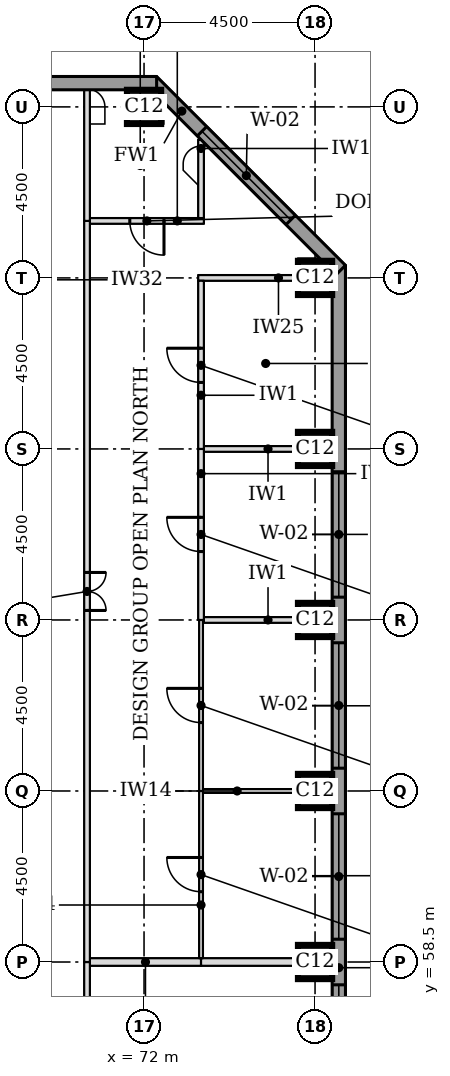
"""IFC4 building model, lengths in metres.
Left out: names, types, materials, properties, quantities, classifications, styles, units other than length and angle.
Written with IfcOpenShell. Run it as: python <this file> out.ifc"""

import sys

from ifc_helpers import new_model, si_unit, direction, frame, frame_2d, origin, origin_2d, place, context, subcontext, project, spatial, rectangle, extrude, element, fill, save


model = new_model("IFC4")
c1 = context("Model", 3, precision=1e-05, world=origin(), true_north=direction((0.0, 1.0)))
c2 = subcontext(c1, "Body", "Model", "MODEL_VIEW")
j1 = project(units=[si_unit("LENGTHUNIT", "METRE"), si_unit("PLANEANGLEUNIT", "RADIAN")], contexts=[c1])
p1 = place(None, origin())
s1 = spatial("IfcSite", under=j1, at=p1, CompositionType="ELEMENT")
p2 = place(p1, origin())
s2 = spatial("IfcBuilding", under=s1, at=p2, CompositionType="ELEMENT")
p3 = place(p2, frame((0.0, 0.0, 226.7)))
s3 = spatial("IfcBuildingStorey", under=s2, at=p3, CompositionType="ELEMENT", Elevation=226.7)
for number, where, z_axis, x_axis in (
    (1, (76.5, 58.5, 0.0), (0.0, 0.0, 1.0), (1.0, 0.0, 0.0)),
    (2, (76.5, 63.0, 0.0), (0.0, 0.0, 1.0), (1.0, 0.0, 0.0)),
    (3, (76.5, 67.5, 0.0), (0.0, 0.0, 1.0), (1.0, 0.0, 0.0)),
    (4, (76.5, 72.0, 0.0), (0.0, 0.0, 1.0), (1.0, 0.0, 0.0)),
    (5, (76.5, 76.5, 0.0), (0.0, 0.0, 1.0), (1.0, 0.0, 0.0)),
    (6, (72.0, 81.0, 0.0), (0.0, 0.0, 1.0), (1.0, 0.0, 0.0)),
):
    element("IfcColumn", number, at=place(p3, frame(where, z_axis=z_axis, x_axis=x_axis)), inside=s3, PredefinedType="COLUMN", context=c2, shape_type="SweptSolid", body=[
        extrude(rectangle(XDim=0.9, YDim=0.9, at=origin_2d()), origin(), (0.0, 0.0, 1.0), 3.7),
    ])
p4 = place(p3, frame((77.125, 44.669, 0.0), z_axis=(0.0, 0.0, 1.0), x_axis=(0.0, 1.0, 0.0)))
e7 = element("IfcWall", 7, at=p4, inside=s3, PredefinedType="STANDARD", context=c2, shape_type="SweptSolid", body=[
    extrude(rectangle(XDim=32.163, YDim=0.35, at=frame_2d((16.081, 0.0))), origin(), (0.0, 0.0, 1.0), 3.525),
])
p5 = place(p4, frame((5.431, 0.0, 0.9)))
e8 = element("IfcOpeningElement", 8, at=p5, cuts=e7, PredefinedType="OPENING", context=c2, shape_type="SweptSolid", body=[
    extrude(rectangle(XDim=3.3, YDim=1.9, at=frame_2d((1.65, 0.95))), frame((0.0, 0.185, 0.0), z_axis=(0.0, -1.0, 0.0), x_axis=(1.0, 0.0, 0.0)), (0.0, 0.0, 1.0), 0.37),
])
p6 = place(p4, frame((9.931, 0.0, 0.9)))
e9 = element("IfcOpeningElement", 9, at=p6, cuts=e7, PredefinedType="OPENING", context=c2, shape_type="SweptSolid", body=[
    extrude(rectangle(XDim=3.3, YDim=1.9, at=frame_2d((1.65, 0.95))), frame((0.0, 0.185, 0.0), z_axis=(0.0, -1.0, 0.0), x_axis=(1.0, 0.0, 0.0)), (0.0, 0.0, 1.0), 0.37),
])
p7 = place(p4, frame((14.431, 0.0, 0.9)))
e10 = element("IfcOpeningElement", 10, at=p7, cuts=e7, PredefinedType="OPENING", context=c2, shape_type="SweptSolid", body=[
    extrude(rectangle(XDim=3.3, YDim=1.9, at=frame_2d((1.65, 0.95))), frame((0.0, 0.185, 0.0), z_axis=(0.0, -1.0, 0.0), x_axis=(1.0, 0.0, 0.0)), (0.0, 0.0, 1.0), 0.37),
])
p8 = place(p4, frame((18.931, 0.0, 0.9)))
e11 = element("IfcOpeningElement", 11, at=p8, cuts=e7, PredefinedType="OPENING", context=c2, shape_type="SweptSolid", body=[
    extrude(rectangle(XDim=3.3, YDim=1.9, at=frame_2d((1.65, 0.95))), frame((0.0, 0.185, 0.0), z_axis=(0.0, -1.0, 0.0), x_axis=(1.0, 0.0, 0.0)), (0.0, 0.0, 1.0), 0.37),
])
p9 = place(p4, frame((23.431, 0.0, 0.9)))
e12 = element("IfcOpeningElement", 12, at=p9, cuts=e7, PredefinedType="OPENING", context=c2, shape_type="SweptSolid", body=[
    extrude(rectangle(XDim=3.3, YDim=1.9, at=frame_2d((1.65, 0.95))), frame((0.0, 0.185, 0.0), z_axis=(0.0, -1.0, 0.0), x_axis=(1.0, 0.0, 0.0)), (0.0, 0.0, 1.0), 0.37),
])
p10 = place(p3, frame((77.176, 76.708, 0.0), z_axis=(0.0, 0.0, 1.0), x_axis=(-0.707106781187, 0.707106781187, 0.0)))
e13 = element("IfcWall", 13, at=p10, inside=s3, PredefinedType="STANDARD", context=c2, shape_type="SweptSolid", body=[
    extrude(rectangle(XDim=7.027, YDim=0.35, at=frame_2d((3.513, 0.0))), origin(), (0.0, 0.0, 1.0), 3.525),
])
p11 = place(p10, frame((1.863, 0.0, 0.9)))
e14 = element("IfcOpeningElement", 14, at=p11, cuts=e13, PredefinedType="OPENING", context=c2, shape_type="SweptSolid", body=[
    extrude(rectangle(XDim=3.3, YDim=1.9, at=frame_2d((1.65, 0.95))), frame((0.0, 0.185, 0.0), z_axis=(0.0, -1.0, 0.0), x_axis=(1.0, 0.0, 0.0)), (0.0, 0.0, 1.0), 0.37),
])
p12 = place(p3, frame((72.331, 81.625, 0.0), z_axis=(0.0, 0.0, 1.0), x_axis=(-1.0, 0.0, 0.0)))
e15 = element("IfcWall", 15, at=p12, inside=s3, PredefinedType="STANDARD", context=c2, shape_type="SweptSolid", body=[
    extrude(rectangle(XDim=32.163, YDim=0.35, at=frame_2d((16.081, 0.0))), origin(), (0.0, 0.0, 1.0), 3.525),
])
p13 = place(p12, frame((5.431, 0.0, 0.9)))
e16 = element("IfcOpeningElement", 16, at=p13, cuts=e15, PredefinedType="OPENING", context=c2, shape_type="SweptSolid", body=[
    extrude(rectangle(XDim=3.3, YDim=1.9, at=frame_2d((1.65, 0.95))), frame((0.0, 0.185, 0.0), z_axis=(0.0, -1.0, 0.0), x_axis=(1.0, 0.0, 0.0)), (0.0, 0.0, 1.0), 0.37),
])
p14 = place(p12, frame((9.931, 0.0, 0.9)))
e17 = element("IfcOpeningElement", 17, at=p14, cuts=e15, PredefinedType="OPENING", context=c2, shape_type="SweptSolid", body=[
    extrude(rectangle(XDim=3.3, YDim=1.9, at=frame_2d((1.65, 0.95))), frame((0.0, 0.185, 0.0), z_axis=(0.0, -1.0, 0.0), x_axis=(1.0, 0.0, 0.0)), (0.0, 0.0, 1.0), 0.37),
])
p15 = place(p12, frame((14.431, 0.0, 0.9)))
e18 = element("IfcOpeningElement", 18, at=p15, cuts=e15, PredefinedType="OPENING", context=c2, shape_type="SweptSolid", body=[
    extrude(rectangle(XDim=3.3, YDim=1.9, at=frame_2d((1.65, 0.95))), frame((0.0, 0.185, 0.0), z_axis=(0.0, -1.0, 0.0), x_axis=(1.0, 0.0, 0.0)), (0.0, 0.0, 1.0), 0.37),
])
p16 = place(p12, frame((18.931, 0.0, 0.9)))
e19 = element("IfcOpeningElement", 19, at=p16, cuts=e15, PredefinedType="OPENING", context=c2, shape_type="SweptSolid", body=[
    extrude(rectangle(XDim=3.3, YDim=1.9, at=frame_2d((1.65, 0.95))), frame((0.0, 0.185, 0.0), z_axis=(0.0, -1.0, 0.0), x_axis=(1.0, 0.0, 0.0)), (0.0, 0.0, 1.0), 0.37),
])
p17 = place(p12, frame((23.431, 0.0, 0.9)))
e20 = element("IfcOpeningElement", 20, at=p17, cuts=e15, PredefinedType="OPENING", context=c2, shape_type="SweptSolid", body=[
    extrude(rectangle(XDim=3.3, YDim=1.9, at=frame_2d((1.65, 0.95))), frame((0.0, 0.185, 0.0), z_axis=(0.0, -1.0, 0.0), x_axis=(1.0, 0.0, 0.0)), (0.0, 0.0, 1.0), 0.37),
])
p18 = place(p3, frame((70.575, 58.5, 0.0), z_axis=(0.0, 0.0, 1.0), x_axis=(1.0, 0.0, 0.0)))
e21 = element("IfcWall", 21, at=p18, inside=s3, PredefinedType="PARTITIONING", context=c2, shape_type="SweptSolid", body=[
    extrude(rectangle(XDim=2.925, YDim=0.2, at=frame_2d((1.462, 0.0))), origin(), (0.0, 0.0, 1.0), 3.55),
])
p19 = place(p3, frame((73.5, 58.5, 0.0), z_axis=(0.0, 0.0, 1.0), x_axis=(1.0, 0.0, 0.0)))
e22 = element("IfcWall", 22, at=p19, inside=s3, PredefinedType="PARTITIONING", context=c2, shape_type="SweptSolid", body=[
    extrude(rectangle(XDim=3.45, YDim=0.2, at=frame_2d((1.725, 0.0))), origin(), (0.0, 0.0, 1.0), 3.55),
])
p20 = place(p3, frame((73.55, 63.0, 0.0), z_axis=(0.0, 0.0, 1.0), x_axis=(1.0, 0.0, 0.0)))
e23 = element("IfcWall", 23, at=p20, inside=s3, PredefinedType="PARTITIONING", context=c2, shape_type="SweptSolid", body=[
    extrude(rectangle(XDim=3.4, YDim=0.1, at=frame_2d((1.7, 0.0))), origin(), (0.0, 0.0, 1.0), 3.55),
])
for number, where, z_axis, x_axis in (
    (24, (73.575, 67.5, 0.0), (0.0, 0.0, 1.0), (1.0, 0.0, 0.0)),
    (25, (73.575, 72.0, 0.0), (0.0, 0.0, 1.0), (1.0, 0.0, 0.0)),
):
    element("IfcWall", number, at=place(p3, frame(where, z_axis=z_axis, x_axis=x_axis)), inside=s3, PredefinedType="PARTITIONING", context=c2, shape_type="SweptSolid", body=[
        extrude(rectangle(XDim=3.375, YDim=0.15, at=frame_2d((1.688, 0.0))), origin(), (0.0, 0.0, 1.0), 3.55),
    ])
p21 = place(p3, frame((73.425, 76.5, 0.0), z_axis=(0.0, 0.0, 1.0), x_axis=(1.0, 0.0, 0.0)))
e26 = element("IfcWall", 26, at=p21, inside=s3, PredefinedType="PARTITIONING", context=c2, shape_type="SweptSolid", body=[
    extrude(rectangle(XDim=2.625, YDim=0.15, at=frame_2d((1.312, 0.0))), origin(), (0.0, 0.0, 1.0), 3.096),
])
p22 = place(p3, frame((70.575, 78.0, 0.0), z_axis=(0.0, 0.0, 1.0), x_axis=(1.0, 0.0, 0.0)))
e27 = element("IfcWall", 27, at=p22, inside=s3, PredefinedType="PARTITIONING", context=c2, shape_type="SweptSolid", body=[
    extrude(rectangle(XDim=3.0, YDim=0.15, at=frame_2d((1.5, 0.0))), origin(), (0.0, 0.0, 1.0), 3.55),
])
p23 = place(p22, frame((1.05, 0.0, 0.0)))
e28 = element("IfcOpeningElement", 28, at=p23, cuts=e27, PredefinedType="OPENING", context=c2, shape_type="SweptSolid", body=[
    extrude(rectangle(XDim=0.9, YDim=2.1, at=frame_2d((0.45, 1.05))), frame((0.0, 0.085, 0.0), z_axis=(0.0, -1.0, 0.0), x_axis=(1.0, 0.0, 0.0)), (0.0, 0.0, 1.0), 0.17),
])
p24 = place(p3, frame((70.5, 45.0, 0.0), z_axis=(0.0, 0.0, 1.0), x_axis=(0.0, 1.0, 0.0)))
e29 = element("IfcWall", 29, at=p24, inside=s3, PredefinedType="PARTITIONING", context=c2, shape_type="SweptSolid", body=[
    extrude(rectangle(XDim=13.5, YDim=0.15, at=frame_2d((6.75, 0.0))), origin(), (0.0, 0.0, 1.0), 3.55),
])
p25 = place(p24, frame((6.25, 0.0, 0.0)))
e30 = element("IfcOpeningElement", 30, at=p25, cuts=e29, PredefinedType="OPENING", context=c2, shape_type="SweptSolid", body=[
    extrude(rectangle(XDim=1.0, YDim=2.1, at=frame_2d((0.5, 1.05))), frame((0.0, 0.085, 0.0), z_axis=(0.0, -1.0, 0.0), x_axis=(1.0, 0.0, 0.0)), (0.0, 0.0, 1.0), 0.17),
])
p26 = place(p3, frame((70.5, 58.5, 0.0), z_axis=(0.0, 0.0, 1.0), x_axis=(0.0, 1.0, 0.0)))
e31 = element("IfcWall", 31, at=p26, inside=s3, PredefinedType="PARTITIONING", context=c2, shape_type="SweptSolid", body=[
    extrude(rectangle(XDim=19.5, YDim=0.15, at=frame_2d((9.75, 0.0))), origin(), (0.0, 0.0, 1.0), 3.55),
])
p27 = place(p26, frame((9.25, 0.0, 0.0)))
e32 = element("IfcOpeningElement", 32, at=p27, cuts=e31, PredefinedType="OPENING", context=c2, shape_type="SweptSolid", body=[
    extrude(rectangle(XDim=1.0, YDim=2.1, at=frame_2d((0.5, 1.05))), frame((0.0, 0.085, 0.0), z_axis=(0.0, -1.0, 0.0), x_axis=(1.0, 0.0, 0.0)), (0.0, 0.0, 1.0), 0.17),
])
p28 = place(p3, frame((73.5, 58.6, 0.0), z_axis=(0.0, 0.0, 1.0), x_axis=(0.0, 1.0, 0.0)))
e33 = element("IfcWall", 33, at=p28, inside=s3, PredefinedType="PARTITIONING", context=c2, shape_type="SweptSolid", body=[
    extrude(rectangle(XDim=4.4, YDim=0.1, at=frame_2d((2.2, 0.0))), origin(), (0.0, 0.0, 1.0), 3.55),
])
p29 = place(p28, frame((1.75, 0.0, 0.0)))
e34 = element("IfcOpeningElement", 34, at=p29, cuts=e33, PredefinedType="OPENING", context=c2, shape_type="SweptSolid", body=[
    extrude(rectangle(XDim=0.9, YDim=2.1, at=frame_2d((0.45, 1.05))), frame((0.0, 0.06, 0.0), z_axis=(0.0, -1.0, 0.0), x_axis=(1.0, 0.0, 0.0)), (0.0, 0.0, 1.0), 0.12),
])
p30 = place(p3, frame((73.5, 63.0, 0.0), z_axis=(0.0, 0.0, 1.0), x_axis=(0.0, 1.0, 0.0)))
e35 = element("IfcWall", 35, at=p30, inside=s3, PredefinedType="PARTITIONING", context=c2, shape_type="SweptSolid", body=[
    extrude(rectangle(XDim=4.5, YDim=0.1, at=frame_2d((2.25, 0.0))), origin(), (0.0, 0.0, 1.0), 3.55),
])
p31 = place(p30, frame((1.8, 0.0, 0.0)))
e36 = element("IfcOpeningElement", 36, at=p31, cuts=e35, PredefinedType="OPENING", context=c2, shape_type="SweptSolid", body=[
    extrude(rectangle(XDim=0.9, YDim=2.1, at=frame_2d((0.45, 1.05))), frame((0.0, 0.06, 0.0), z_axis=(0.0, -1.0, 0.0), x_axis=(1.0, 0.0, 0.0)), (0.0, 0.0, 1.0), 0.12),
])
p32 = place(p3, frame((73.5, 67.5, 0.0), z_axis=(0.0, 0.0, 1.0), x_axis=(0.0, 1.0, 0.0)))
e37 = element("IfcWall", 37, at=p32, inside=s3, PredefinedType="PARTITIONING", context=c2, shape_type="SweptSolid", body=[
    extrude(rectangle(XDim=4.5, YDim=0.15, at=frame_2d((2.25, 0.0))), origin(), (0.0, 0.0, 1.0), 3.55),
])
p33 = place(p32, frame((1.8, 0.0, 0.0)))
e38 = element("IfcOpeningElement", 38, at=p33, cuts=e37, PredefinedType="OPENING", context=c2, shape_type="SweptSolid", body=[
    extrude(rectangle(XDim=0.9, YDim=2.1, at=frame_2d((0.45, 1.05))), frame((0.0, 0.085, 0.0), z_axis=(0.0, -1.0, 0.0), x_axis=(1.0, 0.0, 0.0)), (0.0, 0.0, 1.0), 0.17),
])
p34 = place(p3, frame((73.5, 72.0, 0.0), z_axis=(0.0, 0.0, 1.0), x_axis=(0.0, 1.0, 0.0)))
e39 = element("IfcWall", 39, at=p34, inside=s3, PredefinedType="PARTITIONING", context=c2, shape_type="SweptSolid", body=[
    extrude(rectangle(XDim=4.425, YDim=0.15, at=frame_2d((2.212, 0.0))), origin(), (0.0, 0.0, 1.0), 3.55),
])
p35 = place(p34, frame((1.75, 0.0, 0.0)))
e40 = element("IfcOpeningElement", 40, at=p35, cuts=e39, PredefinedType="OPENING", context=c2, shape_type="SweptSolid", body=[
    extrude(rectangle(XDim=0.9, YDim=2.1, at=frame_2d((0.45, 1.05))), frame((0.0, 0.085, 0.0), z_axis=(0.0, -1.0, 0.0), x_axis=(1.0, 0.0, 0.0)), (0.0, 0.0, 1.0), 0.17),
])
p36 = place(p3, frame((70.5, 78.0, 0.0), z_axis=(0.0, 0.0, 1.0), x_axis=(0.0, 1.0, 0.0)))
e41 = element("IfcWall", 41, at=p36, inside=s3, PredefinedType="PARTITIONING", context=c2, shape_type="SweptSolid", body=[
    extrude(rectangle(XDim=3.45, YDim=0.15, at=frame_2d((1.725, 0.0))), origin(), (0.0, 0.0, 1.0), 3.55),
])
p37 = place(p3, frame((73.5, 78.075, 0.0), z_axis=(0.0, 0.0, 1.0), x_axis=(0.0, 1.0, 0.0)))
e42 = element("IfcWall", 42, at=p37, inside=s3, PredefinedType="PARTITIONING", context=c2, shape_type="SweptSolid", body=[
    extrude(rectangle(XDim=2.062, YDim=0.15, at=frame_2d((1.031, 0.0))), origin(), (0.0, 0.0, 1.0), 3.55),
])
p38 = place(p6, origin())
e43 = element("IfcWindow", 43, at=p38, inside=s3, PartitioningType="SINGLE_PANEL", PredefinedType="WINDOW", context=c2, shape_type="SweptSolid", body=[
    extrude(rectangle(XDim=3.3, YDim=1.9, at=frame_2d((1.65, 0.95))), frame((0.0, 0.085, 0.0), z_axis=(0.0, -1.0, 0.0), x_axis=(1.0, 0.0, 0.0)), (0.0, 0.0, 1.0), 0.06),
])
fill(e9, e43)
p39 = place(p7, origin())
e44 = element("IfcWindow", 44, at=p39, inside=s3, PartitioningType="SINGLE_PANEL", PredefinedType="WINDOW", context=c2, shape_type="SweptSolid", body=[
    extrude(rectangle(XDim=3.3, YDim=1.9, at=frame_2d((1.65, 0.95))), frame((0.0, 0.085, 0.0), z_axis=(0.0, -1.0, 0.0), x_axis=(1.0, 0.0, 0.0)), (0.0, 0.0, 1.0), 0.06),
])
fill(e10, e44)
p40 = place(p8, origin())
e45 = element("IfcWindow", 45, at=p40, inside=s3, PartitioningType="SINGLE_PANEL", PredefinedType="WINDOW", context=c2, shape_type="SweptSolid", body=[
    extrude(rectangle(XDim=3.3, YDim=1.9, at=frame_2d((1.65, 0.95))), frame((0.0, 0.085, 0.0), z_axis=(0.0, -1.0, 0.0), x_axis=(1.0, 0.0, 0.0)), (0.0, 0.0, 1.0), 0.06),
])
fill(e11, e45)
p41 = place(p9, origin())
e46 = element("IfcWindow", 46, at=p41, inside=s3, PartitioningType="SINGLE_PANEL", PredefinedType="WINDOW", context=c2, shape_type="SweptSolid", body=[
    extrude(rectangle(XDim=3.3, YDim=1.9, at=frame_2d((1.65, 0.95))), frame((0.0, 0.085, 0.0), z_axis=(0.0, -1.0, 0.0), x_axis=(1.0, 0.0, 0.0)), (0.0, 0.0, 1.0), 0.06),
])
fill(e12, e46)
p42 = place(p11, origin())
e47 = element("IfcWindow", 47, at=p42, inside=s3, PartitioningType="SINGLE_PANEL", PredefinedType="WINDOW", context=c2, shape_type="SweptSolid", body=[
    extrude(rectangle(XDim=3.3, YDim=1.9, at=frame_2d((1.65, 0.95))), frame((0.0, 0.085, 0.0), z_axis=(0.0, -1.0, 0.0), x_axis=(1.0, 0.0, 0.0)), (0.0, 0.0, 1.0), 0.06),
])
fill(e14, e47)
p43 = place(p27, frame((1.0, 0.0, 0.0), z_axis=(0.0, 0.0, 1.0), x_axis=(-1.0, 0.0, 0.0)))
e48 = element("IfcDoor", 48, at=p43, inside=s3, OperationType="DOUBLE_DOOR_SINGLE_SWING", PredefinedType="DOOR", context=c2, shape_type="SweptSolid", body=[
    extrude(rectangle(XDim=1.0, YDim=2.1, at=frame_2d((0.5, 1.05))), frame((0.0, 0.025, 0.0), z_axis=(0.0, -1.0, 0.0), x_axis=(1.0, 0.0, 0.0)), (0.0, 0.0, 1.0), 0.05),
])
fill(e32, e48)
p44 = place(p29, origin())
e49 = element("IfcDoor", 49, at=p44, inside=s3, OperationType="SINGLE_SWING_RIGHT", PredefinedType="DOOR", context=c2, shape_type="SweptSolid", body=[
    extrude(rectangle(XDim=0.9, YDim=2.1, at=frame_2d((0.45, 1.05))), frame((0.0, 0.025, 0.0), z_axis=(0.0, -1.0, 0.0), x_axis=(1.0, 0.0, 0.0)), (0.0, 0.0, 1.0), 0.05),
])
fill(e34, e49)
p45 = place(p31, origin())
e50 = element("IfcDoor", 50, at=p45, inside=s3, OperationType="SINGLE_SWING_RIGHT", PredefinedType="DOOR", context=c2, shape_type="SweptSolid", body=[
    extrude(rectangle(XDim=0.9, YDim=2.1, at=frame_2d((0.45, 1.05))), frame((0.0, 0.025, 0.0), z_axis=(0.0, -1.0, 0.0), x_axis=(1.0, 0.0, 0.0)), (0.0, 0.0, 1.0), 0.05),
])
fill(e36, e50)
p46 = place(p23, frame((0.9, 0.0, 0.0), z_axis=(0.0, 0.0, 1.0), x_axis=(-1.0, 0.0, 0.0)))
e51 = element("IfcDoor", 51, at=p46, inside=s3, OperationType="SINGLE_SWING_LEFT", PredefinedType="DOOR", context=c2, shape_type="SweptSolid", body=[
    extrude(rectangle(XDim=0.9, YDim=2.1, at=frame_2d((0.45, 1.05))), frame((0.0, 0.025, 0.0), z_axis=(0.0, -1.0, 0.0), x_axis=(1.0, 0.0, 0.0)), (0.0, 0.0, 1.0), 0.05),
])
fill(e28, e51)
p47 = place(p33, origin())
e52 = element("IfcDoor", 52, at=p47, inside=s3, OperationType="SINGLE_SWING_RIGHT", PredefinedType="DOOR", context=c2, shape_type="SweptSolid", body=[
    extrude(rectangle(XDim=0.9, YDim=2.1, at=frame_2d((0.45, 1.05))), frame((0.0, 0.025, 0.0), z_axis=(0.0, -1.0, 0.0), x_axis=(1.0, 0.0, 0.0)), (0.0, 0.0, 1.0), 0.05),
])
fill(e38, e52)
p48 = place(p35, origin())
e53 = element("IfcDoor", 53, at=p48, inside=s3, OperationType="SINGLE_SWING_RIGHT", PredefinedType="DOOR", context=c2, shape_type="SweptSolid", body=[
    extrude(rectangle(XDim=0.9, YDim=2.1, at=frame_2d((0.45, 1.05))), frame((0.0, 0.025, 0.0), z_axis=(0.0, -1.0, 0.0), x_axis=(1.0, 0.0, 0.0)), (0.0, 0.0, 1.0), 0.05),
])
fill(e40, e53)
save(model, sys.argv[1])
